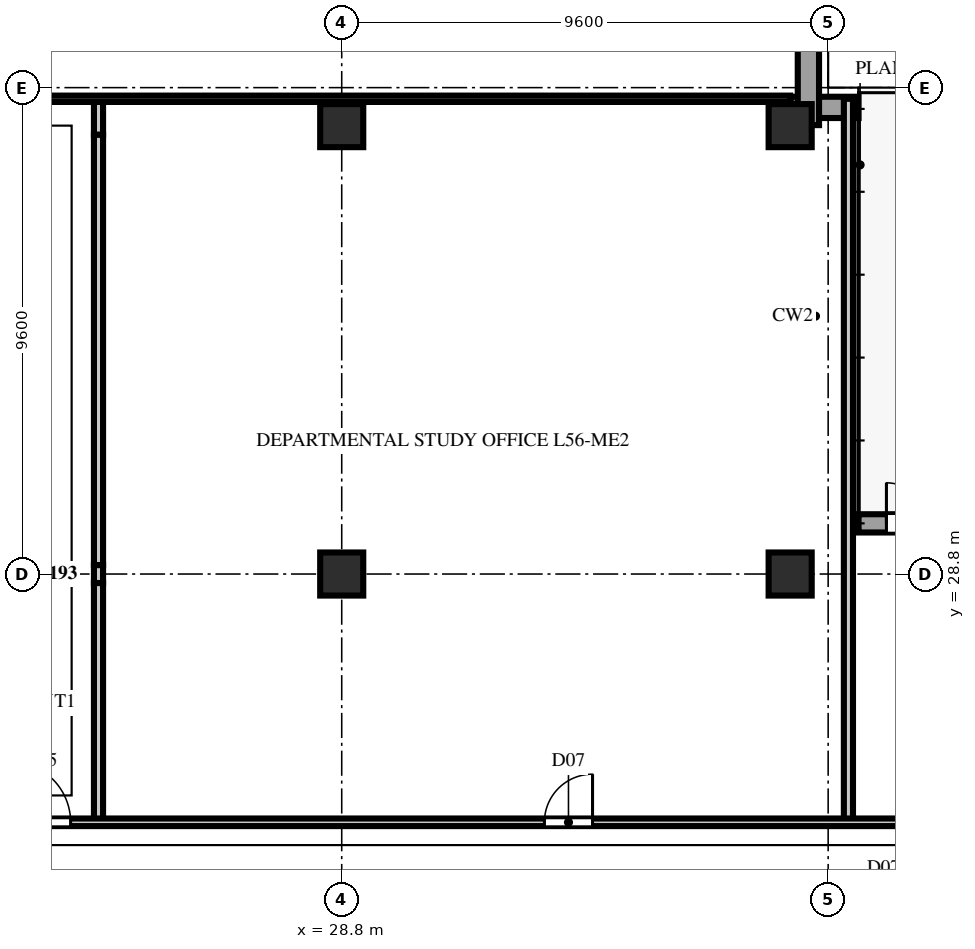
"""IFC4 building model, lengths in metres.
Left out: names, types, materials, properties, quantities, classifications, styles, units other than length and angle.
Written with IfcOpenShell. Run it as: python <this file> out.ifc"""

import sys

from ifc_helpers import new_model, si_unit, direction, frame, frame_2d, origin, origin_2d, place, context, subcontext, project, spatial, rectangle, extrude, element, fill, save


model = new_model("IFC4")
c1 = context("Model", 3, precision=1e-05, world=origin(), true_north=direction((0.0, 1.0)))
c2 = subcontext(c1, "Body", "Model", "MODEL_VIEW")
j1 = project(units=[si_unit("LENGTHUNIT", "METRE"), si_unit("PLANEANGLEUNIT", "RADIAN")], contexts=[c1])
p1 = place(None, origin())
s1 = spatial("IfcSite", under=j1, at=p1, CompositionType="ELEMENT")
p2 = place(p1, origin())
s2 = spatial("IfcBuilding", under=s1, at=p2, CompositionType="ELEMENT")
p3 = place(p2, frame((0.0, 0.0, 221.8)))
s3 = spatial("IfcBuildingStorey", under=s2, at=p3, CompositionType="ELEMENT", Elevation=221.8)
for number, where, z_axis, x_axis in (
    (1, (28.8, 28.8, 0.0), (0.0, 0.0, 1.0), (1.0, 0.0, 0.0)),
    (2, (28.8, 37.65, 0.0), (0.0, 0.0, 1.0), (1.0, 0.0, 0.0)),
    (3, (37.65, 28.8, 0.0), (0.0, 0.0, 1.0), (1.0, 0.0, 0.0)),
    (4, (37.65, 37.65, 0.0), (0.0, 0.0, 1.0), (1.0, 0.0, 0.0)),
):
    element("IfcColumn", number, at=place(p3, frame(where, z_axis=z_axis, x_axis=x_axis)), inside=s3, PredefinedType="COLUMN", context=c2, shape_type="SweptSolid", body=[
        extrude(rectangle(XDim=0.85, YDim=0.85, at=origin_2d()), origin(), (0.0, 0.0, 1.0), 3.8),
    ])
p4 = place(p3, frame((39.0, 38.01, 0.0), z_axis=(0.0, 0.0, 1.0), x_axis=(-1.0, 0.0, 0.0)))
e5 = element("IfcWall", 5, at=p4, inside=s3, PredefinedType="SOLIDWALL", context=c2, shape_type="SweptSolid", body=[
    extrude(rectangle(XDim=1.34, YDim=0.42, at=frame_2d((0.67, 0.0))), origin(), (0.0, 0.0, 1.0), 3.54),
])
p5 = place(p3, frame((38.01, 37.66, 0.0), z_axis=(0.0, 0.0, 1.0), x_axis=(0.0, 1.0, 0.0)))
e6 = element("IfcWall", 6, at=p5, inside=s3, PredefinedType="SOLIDWALL", context=c2, shape_type="SweptSolid", body=[
    extrude(rectangle(XDim=18.1, YDim=0.42, at=frame_2d((9.05, 0.0))), origin(), (0.0, 0.0, 1.0), 3.54),
])
p6 = place(p3, frame((39.0, 29.8, 0.0), z_axis=(0.0, 0.0, 1.0), x_axis=(1.0, 0.0, 0.0)))
e7 = element("IfcWall", 7, at=p6, inside=s3, PredefinedType="SOLIDWALL", context=c2, shape_type="SweptSolid", body=[
    extrude(rectangle(XDim=2.8, YDim=0.36, at=frame_2d((1.4, 0.0))), origin(), (0.0, 0.0, 1.0), 3.54),
])
p7 = place(p6, frame((0.55, 0.0, 0.0)))
e8 = element("IfcOpeningElement", 8, at=p7, cuts=e7, PredefinedType="OPENING", context=c2, shape_type="SweptSolid", body=[
    extrude(rectangle(XDim=1.6, YDim=2.3, at=frame_2d((0.8, 1.15))), frame((0.0, 0.192, 0.0), z_axis=(0.0, -1.0, 0.0), x_axis=(1.0, 0.0, 0.0)), (0.0, 0.0, 1.0), 0.384),
])
p8 = place(p3, frame((24.0, 23.9, 0.0), z_axis=(0.0, 0.0, 1.0), x_axis=(0.0, 1.0, 0.0)))
e9 = element("IfcWall", 9, at=p8, inside=s3, PredefinedType="PARTITIONING", context=c2, shape_type="SweptSolid", body=[
    extrude(rectangle(XDim=4.723, YDim=0.18, at=frame_2d((2.361, 0.0))), origin(), (0.0, 0.0, 1.0), 2.996),
])
p9 = place(p3, frame((24.0, 28.623, 0.0), z_axis=(0.0, 0.0, 1.0), x_axis=(0.0, 1.0, 0.0)))
e10 = element("IfcWall", 10, at=p9, inside=s3, PredefinedType="PARTITIONING", context=c2, shape_type="SweptSolid", body=[
    extrude(rectangle(XDim=0.355, YDim=0.18, at=frame_2d((0.177, 0.0))), origin(), (0.0, 0.0, 1.0), 3.54),
])
p10 = place(p3, frame((24.0, 28.978, 0.0), z_axis=(0.0, 0.0, 1.0), x_axis=(0.0, 1.0, 0.0)))
e11 = element("IfcWall", 11, at=p10, inside=s3, PredefinedType="PARTITIONING", context=c2, shape_type="SweptSolid", body=[
    extrude(rectangle(XDim=8.495, YDim=0.18, at=frame_2d((4.248, 0.0))), origin(), (0.0, 0.0, 1.0), 2.996),
])
p11 = place(p3, frame((24.0, 37.472, 0.0), z_axis=(0.0, 0.0, 1.0), x_axis=(0.0, 1.0, 0.0)))
e12 = element("IfcWall", 12, at=p11, inside=s3, PredefinedType="PARTITIONING", context=c2, shape_type="SweptSolid", body=[
    extrude(rectangle(XDim=0.708, YDim=0.18, at=frame_2d((0.354, 0.0))), origin(), (0.0, 0.0, 1.0), 3.54),
])
p12 = place(p3, frame((38.8, 23.9, 0.0), z_axis=(0.0, 0.0, 1.0), x_axis=(0.0, 1.0, 0.0)))
e13 = element("IfcWall", 13, at=p12, inside=s3, PredefinedType="PARTITIONING", context=c2, shape_type="SweptSolid", body=[
    extrude(rectangle(XDim=14.28, YDim=0.18, at=frame_2d((7.14, 0.0))), origin(), (0.0, 0.0, 1.0), 3.54),
])
p13 = place(p3, frame((19.2, 23.9, 0.0), z_axis=(0.0, 0.0, 1.0), x_axis=(1.0, 0.0, 0.0)))
e14 = element("IfcWall", 14, at=p13, inside=s3, PredefinedType="PARTITIONING", context=c2, shape_type="SweptSolid", body=[
    extrude(rectangle(XDim=38.18, YDim=0.15, at=frame_2d((19.09, 0.0))), origin(), (0.0, 0.0, 1.0), 3.54),
])
p14 = place(p13, frame((3.05, 0.0, 0.0)))
e15 = element("IfcOpeningElement", 15, at=p14, cuts=e14, PredefinedType="OPENING", context=c2, shape_type="SweptSolid", body=[
    extrude(rectangle(XDim=1.2, YDim=2.2, at=frame_2d((0.6, 1.1))), frame((0.0, 0.087, 0.0), z_axis=(0.0, -1.0, 0.0), x_axis=(1.0, 0.0, 0.0)), (0.0, 0.0, 1.0), 0.174),
])
p15 = place(p13, frame((13.6, 0.0, 0.0)))
e16 = element("IfcOpeningElement", 16, at=p15, cuts=e14, PredefinedType="OPENING", context=c2, shape_type="SweptSolid", body=[
    extrude(rectangle(XDim=0.95, YDim=2.15, at=frame_2d((0.475, 1.075))), frame((0.0, 0.087, 0.0), z_axis=(0.0, -1.0, 0.0), x_axis=(1.0, 0.0, 0.0)), (0.0, 0.0, 1.0), 0.174),
])
p16 = place(p13, frame((22.8, 0.0, 0.0)))
e17 = element("IfcOpeningElement", 17, at=p16, cuts=e14, PredefinedType="OPENING", context=c2, shape_type="SweptSolid", body=[
    extrude(rectangle(XDim=0.95, YDim=2.15, at=frame_2d((0.475, 1.075))), frame((0.0, 0.087, 0.0), z_axis=(0.0, -1.0, 0.0), x_axis=(1.0, 0.0, 0.0)), (0.0, 0.0, 1.0), 0.174),
])
p17 = place(p13, frame((32.05, 0.0, 0.0)))
e18 = element("IfcOpeningElement", 18, at=p17, cuts=e14, PredefinedType="OPENING", context=c2, shape_type="SweptSolid", body=[
    extrude(rectangle(XDim=1.0, YDim=2.2, at=frame_2d((0.5, 1.1))), frame((0.0, 0.087, 0.0), z_axis=(0.0, -1.0, 0.0), x_axis=(1.0, 0.0, 0.0)), (0.0, 0.0, 1.0), 0.174),
])
p18 = place(p3, frame((19.28, 38.18, 0.0), z_axis=(0.0, 0.0, 1.0), x_axis=(1.0, 0.0, 0.0)))
e19 = element("IfcWall", 19, at=p18, inside=s3, PredefinedType="PARTITIONING", context=c2, shape_type="SweptSolid", body=[
    extrude(rectangle(XDim=18.37, YDim=0.125, at=frame_2d((9.185, 0.0))), origin(), (0.0, 0.0, 1.0), 3.54),
])
p19 = place(p7, origin())
e20 = element("IfcDoor", 20, at=p19, inside=s3, OperationType="DOUBLE_SWING_LEFT", PredefinedType="DOOR", context=c2, shape_type="SweptSolid", body=[
    extrude(rectangle(XDim=1.6, YDim=2.3, at=frame_2d((0.8, 1.15))), frame((0.0, 0.025, 0.0), z_axis=(0.0, -1.0, 0.0), x_axis=(1.0, 0.0, 0.0)), (0.0, 0.0, 1.0), 0.05),
])
fill(e8, e20)
p20 = place(p14, origin())
e21 = element("IfcDoor", 21, at=p20, inside=s3, OperationType="SINGLE_SWING_LEFT", PredefinedType="DOOR", context=c2, shape_type="SweptSolid", body=[
    extrude(rectangle(XDim=1.2, YDim=2.2, at=frame_2d((0.6, 1.1))), frame((0.0, 0.025, 0.0), z_axis=(0.0, -1.0, 0.0), x_axis=(1.0, 0.0, 0.0)), (0.0, 0.0, 1.0), 0.05),
])
fill(e15, e21)
p21 = place(p15, origin())
e22 = element("IfcDoor", 22, at=p21, inside=s3, OperationType="SINGLE_SWING_RIGHT", PredefinedType="DOOR", context=c2, shape_type="SweptSolid", body=[
    extrude(rectangle(XDim=0.95, YDim=2.15, at=frame_2d((0.475, 1.075))), frame((0.0, 0.025, 0.0), z_axis=(0.0, -1.0, 0.0), x_axis=(1.0, 0.0, 0.0)), (0.0, 0.0, 1.0), 0.05),
])
fill(e16, e22)
save(model, sys.argv[1])
